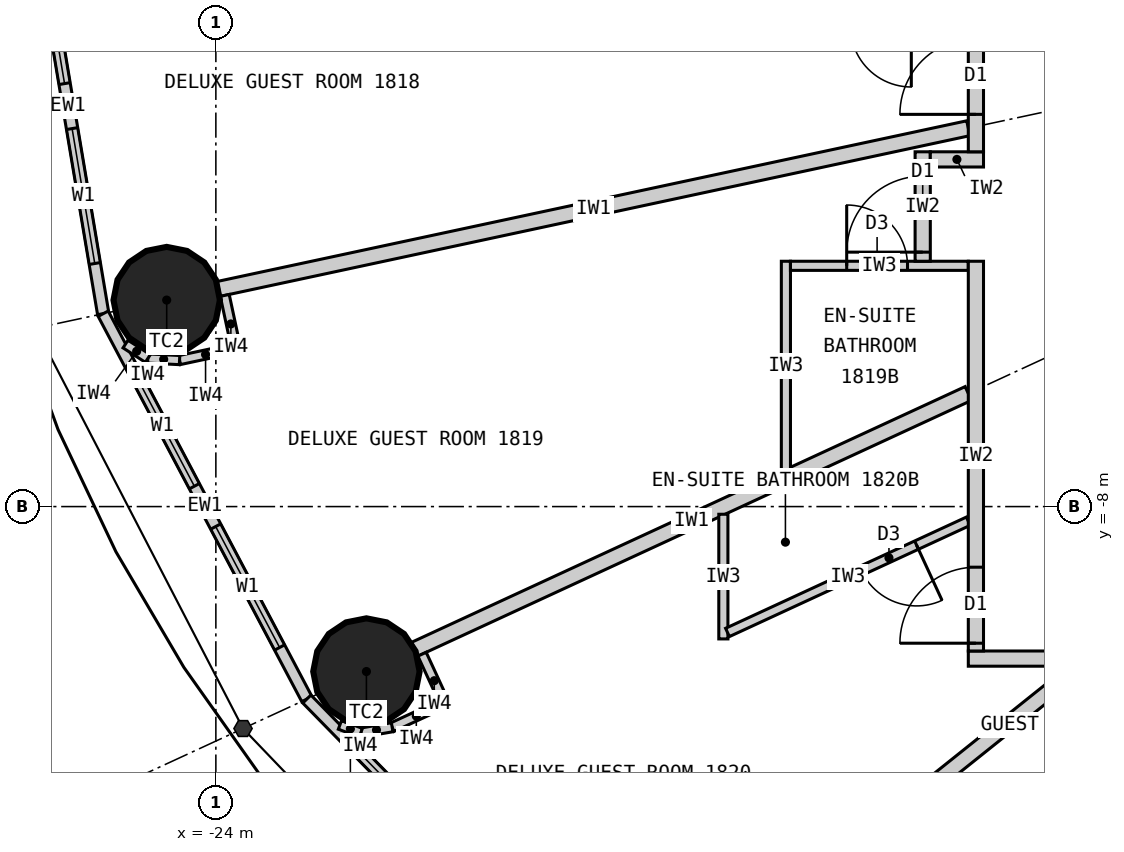
"""IFC4 building model, lengths in metres.
Left out: names, types, materials, properties, quantities, classifications, styles, units other than length and angle.
Written with IfcOpenShell. Run it as: python <this file> out.ifc"""

import sys

from ifc_helpers import new_model, si_unit, direction, frame, frame_2d, origin, origin_2d, place, context, subcontext, project, spatial, rectangle, circle, extrude, element, fill, save


model = new_model("IFC4")
c1 = context("Model", 3, precision=1e-05, world=origin(), true_north=direction((0.0, 1.0)))
c2 = subcontext(c1, "Body", "Model", "MODEL_VIEW")
j1 = project(units=[si_unit("LENGTHUNIT", "METRE"), si_unit("PLANEANGLEUNIT", "RADIAN")], contexts=[c1])
p1 = place(None, origin())
s1 = spatial("IfcSite", under=j1, at=p1, CompositionType="ELEMENT")
p2 = place(p1, origin())
s2 = spatial("IfcBuilding", under=s1, at=p2, CompositionType="ELEMENT")
p3 = place(p2, frame((0.0, 0.0, 73.8)))
s3 = spatial("IfcBuildingStorey", under=s2, at=p3, CompositionType="ELEMENT", Elevation=73.8)
for number, where, z_axis, x_axis in (
    (1, (-24.647, -5.283, 0.0), (0.0, 0.0, 1.0), (1.0, 0.0, 0.0)),
    (2, (-22.019, -10.17, 0.0), (0.0, 0.0, 1.0), (1.0, 0.0, 0.0)),
):
    element("IfcColumn", number, at=place(p3, frame(where, z_axis=z_axis, x_axis=x_axis)), inside=s3, PredefinedType="COLUMN", context=c2, shape_type="SweptSolid", body=[
        extrude(circle(Radius=0.7, at=origin_2d()), origin(), (0.0, 0.0, 1.0), 3.3),
    ])
p4 = place(p3, frame((-26.4, 0.0, 0.0), z_axis=(0.0, 0.0, 1.0), x_axis=(0.165642551694, -0.986185857264, 0.0)))
e3 = element("IfcWall", 3, at=p4, inside=s3, PredefinedType="ELEMENTEDWALL", context=c2, shape_type="SweptSolid", body=[
    extrude(rectangle(XDim=5.539, YDim=0.15, at=frame_2d((2.77, 0.0))), origin(), (0.0, 0.0, 1.0), 3.12),
])
p5 = place(p4, frame((0.669, 0.0, 0.9)))
e4 = element("IfcOpeningElement", 4, at=p5, cuts=e3, PredefinedType="OPENING", context=c2, shape_type="SweptSolid", body=[
    extrude(rectangle(XDim=1.8, YDim=1.9, at=frame_2d((0.9, 0.95))), frame((0.0, 0.085, 0.0), z_axis=(0.0, -1.0, 0.0), x_axis=(1.0, 0.0, 0.0)), (0.0, 0.0, 1.0), 0.17),
])
p6 = place(p4, frame((3.07, 0.0, 0.9)))
e5 = element("IfcOpeningElement", 5, at=p6, cuts=e3, PredefinedType="OPENING", context=c2, shape_type="SweptSolid", body=[
    extrude(rectangle(XDim=1.8, YDim=1.9, at=frame_2d((0.9, 0.95))), frame((0.0, 0.085, 0.0), z_axis=(0.0, -1.0, 0.0), x_axis=(1.0, 0.0, 0.0)), (0.0, 0.0, 1.0), 0.17),
])
p7 = place(p3, frame((-25.482, -5.462, 0.0), z_axis=(0.0, 0.0, 1.0), x_axis=(0.467296867008, -0.884100468321, 0.0)))
e6 = element("IfcWall", 6, at=p7, inside=s3, PredefinedType="ELEMENTEDWALL", context=c2, shape_type="SweptSolid", body=[
    extrude(rectangle(XDim=5.734, YDim=0.15, at=frame_2d((2.867, 0.0))), origin(), (0.0, 0.0, 1.0), 3.12),
])
p8 = place(p7, frame((0.767, 0.0, 0.9)))
e7 = element("IfcOpeningElement", 7, at=p8, cuts=e6, PredefinedType="OPENING", context=c2, shape_type="SweptSolid", body=[
    extrude(rectangle(XDim=1.8, YDim=1.9, at=frame_2d((0.9, 0.95))), frame((0.0, 0.085, 0.0), z_axis=(0.0, -1.0, 0.0), x_axis=(1.0, 0.0, 0.0)), (0.0, 0.0, 1.0), 0.17),
])
p9 = place(p7, frame((3.167, 0.0, 0.9)))
e8 = element("IfcOpeningElement", 8, at=p9, cuts=e6, PredefinedType="OPENING", context=c2, shape_type="SweptSolid", body=[
    extrude(rectangle(XDim=1.8, YDim=1.9, at=frame_2d((0.9, 0.95))), frame((0.0, 0.085, 0.0), z_axis=(0.0, -1.0, 0.0), x_axis=(1.0, 0.0, 0.0)), (0.0, 0.0, 1.0), 0.17),
])
p10 = place(p3, frame((-22.803, -10.532, 0.0), z_axis=(0.0, 0.0, 1.0), x_axis=(0.699602905915, -0.714531856557, 0.0)))
e9 = element("IfcWall", 9, at=p10, inside=s3, PredefinedType="ELEMENTEDWALL", context=c2, shape_type="SweptSolid", body=[
    extrude(rectangle(XDim=6.051, YDim=0.15, at=frame_2d((3.025, 0.0))), origin(), (0.0, 0.0, 1.0), 3.12),
])
p11 = place(p10, frame((0.926, 0.0, 0.9)))
e10 = element("IfcOpeningElement", 10, at=p11, cuts=e9, PredefinedType="OPENING", context=c2, shape_type="SweptSolid", body=[
    extrude(rectangle(XDim=1.8, YDim=1.9, at=frame_2d((0.9, 0.95))), frame((0.0, 0.085, 0.0), z_axis=(0.0, -1.0, 0.0), x_axis=(1.0, 0.0, 0.0)), (0.0, 0.0, 1.0), 0.17),
])
p12 = place(p10, frame((3.325, 0.0, 0.9)))
e11 = element("IfcOpeningElement", 11, at=p12, cuts=e9, PredefinedType="OPENING", context=c2, shape_type="SweptSolid", body=[
    extrude(rectangle(XDim=1.8, YDim=1.9, at=frame_2d((0.9, 0.95))), frame((0.0, 0.085, 0.0), z_axis=(0.0, -1.0, 0.0), x_axis=(1.0, 0.0, 0.0)), (0.0, 0.0, 1.0), 0.17),
])
p13 = place(p3, frame((14.1, -10.0, 0.0), z_axis=(0.0, 0.0, 1.0), x_axis=(-1.0, 0.0, 0.0)))
e12 = element("IfcWall", 12, at=p13, inside=s3, PredefinedType="PARTITIONING", context=c2, shape_type="SweptSolid", body=[
    extrude(rectangle(XDim=28.2, YDim=0.2, at=frame_2d((14.1, 0.0))), origin(), (0.0, 0.0, 1.0), 3.12),
])
p14 = place(p13, frame((24.165, 0.0, 0.0)))
e13 = element("IfcOpeningElement", 13, at=p14, cuts=e12, PredefinedType="OPENING", context=c2, shape_type="SweptSolid", body=[
    extrude(rectangle(XDim=1.0, YDim=2.2, at=frame_2d((0.5, 1.1))), frame((0.0, 0.11, 0.0), z_axis=(0.0, -1.0, 0.0), x_axis=(1.0, 0.0, 0.0)), (0.0, 0.0, 1.0), 0.22),
])
p15 = place(p13, frame((14.923, 0.0, 0.0)))
e14 = element("IfcOpeningElement", 14, at=p15, cuts=e12, PredefinedType="OPENING", context=c2, shape_type="SweptSolid", body=[
    extrude(rectangle(XDim=1.0, YDim=2.2, at=frame_2d((0.5, 1.1))), frame((0.0, 0.11, 0.0), z_axis=(0.0, -1.0, 0.0), x_axis=(1.0, 0.0, 0.0)), (0.0, 0.0, 1.0), 0.22),
])
p16 = place(p13, frame((3.035, 0.0, 0.0)))
e15 = element("IfcOpeningElement", 15, at=p16, cuts=e12, PredefinedType="OPENING", context=c2, shape_type="SweptSolid", body=[
    extrude(rectangle(XDim=1.0, YDim=2.2, at=frame_2d((0.5, 1.1))), frame((0.0, 0.11, 0.0), z_axis=(0.0, -1.0, 0.0), x_axis=(1.0, 0.0, 0.0)), (0.0, 0.0, 1.0), 0.22),
])
p17 = place(p3, frame((-14.1, -3.022, 0.0), z_axis=(0.0, 0.0, 1.0), x_axis=(-0.977790014929, -0.209586943072, 0.0)))
e16 = element("IfcWall", 16, at=p17, inside=s3, PredefinedType="PARTITIONING", context=c2, shape_type="SweptSolid", body=[
    extrude(rectangle(XDim=10.087, YDim=0.2, at=frame_2d((5.043, 0.0))), origin(), (0.0, 0.0, 1.0), 2.32),
])
p18 = place(p3, frame((-14.1, -6.512, 0.0), z_axis=(0.0, 0.0, 1.0), x_axis=(-0.907832871056, -0.419332181247, 0.0)))
e17 = element("IfcWall", 17, at=p18, inside=s3, PredefinedType="PARTITIONING", context=c2, shape_type="SweptSolid", body=[
    extrude(rectangle(XDim=8.023, YDim=0.2, at=frame_2d((4.011, 0.0))), origin(), (0.0, 0.0, 1.0), 2.32),
])
p19 = place(p3, frame((-12.625, -10.1, 0.0), z_axis=(0.0, 0.0, 1.0), x_axis=(-0.780892451574, -0.624665493744, 0.0)))
e18 = element("IfcWall", 18, at=p19, inside=s3, PredefinedType="PARTITIONING", context=c2, shape_type="SweptSolid", body=[
    extrude(rectangle(XDim=6.045, YDim=0.2, at=frame_2d((3.022, 0.0))), origin(), (0.0, 0.0, 1.0), 2.32),
])
p20 = place(p3, frame((-16.5, -7.521, 0.0), z_axis=(0.0, 0.0, 1.0), x_axis=(0.0, 1.0, 0.0)))
e19 = element("IfcWall", 19, at=p20, inside=s3, PredefinedType="PARTITIONING", context=c2, shape_type="SweptSolid", body=[
    extrude(rectangle(XDim=2.749, YDim=0.12, at=frame_2d((1.374, 0.0))), origin(), (0.0, 0.0, 1.0), 3.12),
])
p21 = place(p3, frame((-14.1, -4.833, 0.0), z_axis=(0.0, 0.0, 1.0), x_axis=(-1.0, 0.0, 0.0)))
e20 = element("IfcWall", 20, at=p21, inside=s3, PredefinedType="PARTITIONING", context=c2, shape_type="SweptSolid", body=[
    extrude(rectangle(XDim=2.34, YDim=0.12, at=frame_2d((1.17, 0.0))), origin(), (0.0, 0.0, 1.0), 3.12),
])
p22 = place(p21, frame((0.8, 0.0, 0.0)))
e21 = element("IfcOpeningElement", 21, at=p22, cuts=e20, PredefinedType="OPENING", context=c2, shape_type="SweptSolid", body=[
    extrude(rectangle(XDim=0.8, YDim=2.1, at=frame_2d((0.4, 1.05))), frame((0.0, 0.07, 0.0), z_axis=(0.0, -1.0, 0.0), x_axis=(1.0, 0.0, 0.0)), (0.0, 0.0, 1.0), 0.14),
])
p23 = place(p3, frame((-17.323, -8.101, 0.0), z_axis=(0.0, 0.0, 1.0), x_axis=(0.0, -1.0, 0.0)))
e22 = element("IfcWall", 22, at=p23, inside=s3, PredefinedType="PARTITIONING", context=c2, shape_type="SweptSolid", body=[
    extrude(rectangle(XDim=1.64, YDim=0.12, at=frame_2d((0.82, 0.0))), origin(), (0.0, 0.0, 1.0), 3.12),
])
p24 = place(p3, frame((-14.1, -8.193, 0.0), z_axis=(0.0, 0.0, 1.0), x_axis=(-0.907836493557, -0.419324338628, 0.0)))
e23 = element("IfcWall", 23, at=p24, inside=s3, PredefinedType="PARTITIONING", context=c2, shape_type="SweptSolid", body=[
    extrude(rectangle(XDim=3.49, YDim=0.12, at=frame_2d((1.745, 0.0))), origin(), (0.0, 0.0, 1.0), 3.12),
])
p25 = place(p24, frame((0.75, 0.0, 0.0)))
e24 = element("IfcOpeningElement", 24, at=p25, cuts=e23, PredefinedType="OPENING", context=c2, shape_type="SweptSolid", body=[
    extrude(rectangle(XDim=0.8, YDim=2.1, at=frame_2d((0.4, 1.05))), frame((0.0, 0.07, 0.0), z_axis=(0.0, -1.0, 0.0), x_axis=(1.0, 0.0, 0.0)), (0.0, 0.0, 1.0), 0.14),
])
p26 = place(p3, frame((-14.7, -3.333, 0.0), z_axis=(0.0, 0.0, 1.0), x_axis=(0.0, -1.0, 0.0)))
e25 = element("IfcWall", 25, at=p26, inside=s3, PredefinedType="PARTITIONING", context=c2, shape_type="SweptSolid", body=[
    extrude(rectangle(XDim=1.44, YDim=0.2, at=frame_2d((0.72, 0.0))), origin(), (0.0, 0.0, 1.0), 3.12),
])
p27 = place(p26, frame((0.32, 0.0, 0.0)))
e26 = element("IfcOpeningElement", 26, at=p27, cuts=e25, PredefinedType="OPENING", context=c2, shape_type="SweptSolid", body=[
    extrude(rectangle(XDim=1.0, YDim=2.2, at=frame_2d((0.5, 1.1))), frame((0.0, 0.11, 0.0), z_axis=(0.0, -1.0, 0.0), x_axis=(1.0, 0.0, 0.0)), (0.0, 0.0, 1.0), 0.22),
])
p28 = place(p3, frame((-13.9, -3.433, 0.0), z_axis=(0.0, 0.0, 1.0), x_axis=(-1.0, 0.0, 0.0)))
e27 = element("IfcWall", 27, at=p28, inside=s3, PredefinedType="PARTITIONING", context=c2, shape_type="SweptSolid", body=[
    extrude(rectangle(XDim=0.7, YDim=0.2, at=frame_2d((0.35, 0.0))), origin(), (0.0, 0.0, 1.0), 2.32),
])
p29 = place(p3, frame((-14.0, 3.333, 0.0), z_axis=(0.0, 0.0, 1.0), x_axis=(0.0, -1.0, 0.0)))
e28 = element("IfcWall", 28, at=p29, inside=s3, PredefinedType="PARTITIONING", context=c2, shape_type="SweptSolid", body=[
    extrude(rectangle(XDim=6.665, YDim=0.2, at=frame_2d((3.333, 0.0))), origin(), (0.0, 0.0, 1.0), 3.12),
])
p30 = place(p29, frame((2.15, 0.0, 0.0)))
e29 = element("IfcOpeningElement", 29, at=p30, cuts=e28, PredefinedType="OPENING", context=c2, shape_type="SweptSolid", body=[
    extrude(rectangle(XDim=1.0, YDim=2.2, at=frame_2d((0.5, 1.1))), frame((0.0, 0.11, 0.0), z_axis=(0.0, -1.0, 0.0), x_axis=(1.0, 0.0, 0.0)), (0.0, 0.0, 1.0), 0.22),
])
p31 = place(p29, frame((5.173, 0.0, 0.0)))
e30 = element("IfcOpeningElement", 30, at=p31, cuts=e28, PredefinedType="OPENING", context=c2, shape_type="SweptSolid", body=[
    extrude(rectangle(XDim=1.0, YDim=2.2, at=frame_2d((0.5, 1.1))), frame((0.0, 0.11, 0.0), z_axis=(0.0, -1.0, 0.0), x_axis=(1.0, 0.0, 0.0)), (0.0, 0.0, 1.0), 0.22),
])
p32 = place(p3, frame((-14.0, -4.772, 0.0), z_axis=(0.0, 0.0, 1.0), x_axis=(0.0, -1.0, 0.0)))
e31 = element("IfcWall", 31, at=p32, inside=s3, PredefinedType="PARTITIONING", context=c2, shape_type="SweptSolid", body=[
    extrude(rectangle(XDim=5.127, YDim=0.2, at=frame_2d((2.564, 0.0))), origin(), (0.0, 0.0, 1.0), 3.12),
])
p33 = place(p32, frame((4.025, 0.0, 0.0)))
e32 = element("IfcOpeningElement", 32, at=p33, cuts=e31, PredefinedType="OPENING", context=c2, shape_type="SweptSolid", body=[
    extrude(rectangle(XDim=1.0, YDim=2.2, at=frame_2d((0.5, 1.1))), frame((0.0, 0.11, 0.0), z_axis=(0.0, -1.0, 0.0), x_axis=(1.0, 0.0, 0.0)), (0.0, 0.0, 1.0), 0.22),
])
p34 = place(p3, frame((-23.883, -5.222, 0.0), z_axis=(0.0, 0.0, 1.0), x_axis=(0.209311842415, -0.977848941619, 0.0)))
e33 = element("IfcWall", 33, at=p34, inside=s3, PredefinedType="PARTITIONING", context=c2, shape_type="SweptSolid", body=[
    extrude(rectangle(XDim=0.768, YDim=0.12, at=frame_2d((0.384, 0.0))), origin(), (0.0, 0.0, 1.0), 3.12),
])
p35 = place(p3, frame((-23.793, -5.926, 0.0), z_axis=(0.0, 0.0, 1.0), x_axis=(-0.977792206673, -0.209576717621, 0.0)))
e34 = element("IfcWall", 34, at=p35, inside=s3, PredefinedType="PARTITIONING", context=c2, shape_type="SweptSolid", body=[
    extrude(rectangle(XDim=0.7, YDim=0.12, at=frame_2d((0.35, 0.0))), origin(), (0.0, 0.0, 1.0), 3.12),
])
p36 = place(p3, frame((-24.478, -6.073, 0.0), z_axis=(0.0, 0.0, 1.0), x_axis=(-0.998708262812, 0.05081147302, 0.0)))
e35 = element("IfcWall", 35, at=p36, inside=s3, PredefinedType="PARTITIONING", context=c2, shape_type="SweptSolid", body=[
    extrude(rectangle(XDim=0.418, YDim=0.12, at=frame_2d((0.209, 0.0))), origin(), (0.0, 0.0, 1.0), 3.12),
])
p37 = place(p3, frame((-24.895, -6.052, 0.0), z_axis=(0.0, 0.0, 1.0), x_axis=(-0.839495197275, 0.54336710772, 0.0)))
e36 = element("IfcWall", 36, at=p37, inside=s3, PredefinedType="PARTITIONING", context=c2, shape_type="SweptSolid", body=[
    extrude(rectangle(XDim=0.35, YDim=0.12, at=frame_2d((0.175, 0.0))), origin(), (0.0, 0.0, 1.0), 3.12),
])
p38 = place(p3, frame((-21.287, -9.942, 0.0), z_axis=(0.0, 0.0, 1.0), x_axis=(0.419259891039, -0.907866258744, 0.0)))
e37 = element("IfcWall", 37, at=p38, inside=s3, PredefinedType="PARTITIONING", context=c2, shape_type="SweptSolid", body=[
    extrude(rectangle(XDim=0.768, YDim=0.12, at=frame_2d((0.384, 0.0))), origin(), (0.0, 0.0, 1.0), 3.12),
])
p39 = place(p3, frame((-21.045, -10.61, 0.0), z_axis=(0.0, 0.0, 1.0), x_axis=(-0.907877701396, -0.419235112208, 0.0)))
e38 = element("IfcWall", 38, at=p39, inside=s3, PredefinedType="PARTITIONING", context=c2, shape_type="SweptSolid", body=[
    extrude(rectangle(XDim=0.7, YDim=0.12, at=frame_2d((0.35, 0.0))), origin(), (0.0, 0.0, 1.0), 3.12),
])
p40 = place(p3, frame((-21.68, -10.903, 0.0), z_axis=(0.0, 0.0, 1.0), x_axis=(-0.985446622073, -0.169985161247, 0.0)))
e39 = element("IfcWall", 39, at=p40, inside=s3, PredefinedType="PARTITIONING", context=c2, shape_type="SweptSolid", body=[
    extrude(rectangle(XDim=0.418, YDim=0.12, at=frame_2d((0.209, 0.0))), origin(), (0.0, 0.0, 1.0), 3.12),
])
p41 = place(p3, frame((-22.092, -10.974, 0.0), z_axis=(0.0, 0.0, 1.0), x_axis=(-0.938428160676, 0.345474437912, 0.0)))
e40 = element("IfcWall", 40, at=p41, inside=s3, PredefinedType="PARTITIONING", context=c2, shape_type="SweptSolid", body=[
    extrude(rectangle(XDim=0.294, YDim=0.12, at=frame_2d((0.147, 0.0))), origin(), (0.0, 0.0, 1.0), 3.12),
])
p42 = place(p5, origin())
e41 = element("IfcWindow", 41, at=p42, inside=s3, PartitioningType="SINGLE_PANEL", PredefinedType="WINDOW", context=c2, shape_type="SweptSolid", body=[
    extrude(rectangle(XDim=1.8, YDim=1.9, at=frame_2d((0.9, 0.95))), frame((0.0, 0.03, 0.0), z_axis=(0.0, -1.0, 0.0), x_axis=(1.0, 0.0, 0.0)), (0.0, 0.0, 1.0), 0.06),
])
fill(e4, e41)
p43 = place(p6, origin())
e42 = element("IfcWindow", 42, at=p43, inside=s3, PartitioningType="SINGLE_PANEL", PredefinedType="WINDOW", context=c2, shape_type="SweptSolid", body=[
    extrude(rectangle(XDim=1.8, YDim=1.9, at=frame_2d((0.9, 0.95))), frame((0.0, 0.03, 0.0), z_axis=(0.0, -1.0, 0.0), x_axis=(1.0, 0.0, 0.0)), (0.0, 0.0, 1.0), 0.06),
])
fill(e5, e42)
p44 = place(p8, origin())
e43 = element("IfcWindow", 43, at=p44, inside=s3, PartitioningType="SINGLE_PANEL", PredefinedType="WINDOW", context=c2, shape_type="SweptSolid", body=[
    extrude(rectangle(XDim=1.8, YDim=1.9, at=frame_2d((0.9, 0.95))), frame((0.0, 0.03, 0.0), z_axis=(0.0, -1.0, 0.0), x_axis=(1.0, 0.0, 0.0)), (0.0, 0.0, 1.0), 0.06),
])
fill(e7, e43)
p45 = place(p9, origin())
e44 = element("IfcWindow", 44, at=p45, inside=s3, PartitioningType="SINGLE_PANEL", PredefinedType="WINDOW", context=c2, shape_type="SweptSolid", body=[
    extrude(rectangle(XDim=1.8, YDim=1.9, at=frame_2d((0.9, 0.95))), frame((0.0, 0.03, 0.0), z_axis=(0.0, -1.0, 0.0), x_axis=(1.0, 0.0, 0.0)), (0.0, 0.0, 1.0), 0.06),
])
fill(e8, e44)
p46 = place(p11, origin())
e45 = element("IfcWindow", 45, at=p46, inside=s3, PartitioningType="SINGLE_PANEL", PredefinedType="WINDOW", context=c2, shape_type="SweptSolid", body=[
    extrude(rectangle(XDim=1.8, YDim=1.9, at=frame_2d((0.9, 0.95))), frame((0.0, 0.03, 0.0), z_axis=(0.0, -1.0, 0.0), x_axis=(1.0, 0.0, 0.0)), (0.0, 0.0, 1.0), 0.06),
])
fill(e10, e45)
p47 = place(p31, origin())
e46 = element("IfcDoor", 46, at=p47, inside=s3, OperationType="SINGLE_SWING_RIGHT", PredefinedType="DOOR", context=c2, shape_type="SweptSolid", body=[
    extrude(rectangle(XDim=1.0, YDim=2.2, at=frame_2d((0.5, 1.1))), frame((0.0, 0.025, 0.0), z_axis=(0.0, -1.0, 0.0), x_axis=(1.0, 0.0, 0.0)), (0.0, 0.0, 1.0), 0.05),
])
fill(e30, e46)
p48 = place(p22, origin())
e47 = element("IfcDoor", 47, at=p48, inside=s3, OperationType="SINGLE_SWING_RIGHT", PredefinedType="DOOR", context=c2, shape_type="SweptSolid", body=[
    extrude(rectangle(XDim=0.8, YDim=2.1, at=frame_2d((0.4, 1.05))), frame((0.0, 0.025, 0.0), z_axis=(0.0, -1.0, 0.0), x_axis=(1.0, 0.0, 0.0)), (0.0, 0.0, 1.0), 0.05),
])
fill(e21, e47)
p49 = place(p27, origin())
e48 = element("IfcDoor", 48, at=p49, inside=s3, OperationType="SINGLE_SWING_RIGHT", PredefinedType="DOOR", context=c2, shape_type="SweptSolid", body=[
    extrude(rectangle(XDim=1.0, YDim=2.2, at=frame_2d((0.5, 1.1))), frame((0.0, 0.025, 0.0), z_axis=(0.0, -1.0, 0.0), x_axis=(1.0, 0.0, 0.0)), (0.0, 0.0, 1.0), 0.05),
])
fill(e26, e48)
p50 = place(p25, origin())
e49 = element("IfcDoor", 49, at=p50, inside=s3, OperationType="SINGLE_SWING_LEFT", PredefinedType="DOOR", context=c2, shape_type="SweptSolid", body=[
    extrude(rectangle(XDim=0.8, YDim=2.1, at=frame_2d((0.4, 1.05))), frame((0.0, 0.025, 0.0), z_axis=(0.0, -1.0, 0.0), x_axis=(1.0, 0.0, 0.0)), (0.0, 0.0, 1.0), 0.05),
])
fill(e24, e49)
p51 = place(p33, origin())
e50 = element("IfcDoor", 50, at=p51, inside=s3, OperationType="SINGLE_SWING_RIGHT", PredefinedType="DOOR", context=c2, shape_type="SweptSolid", body=[
    extrude(rectangle(XDim=1.0, YDim=2.2, at=frame_2d((0.5, 1.1))), frame((0.0, 0.025, 0.0), z_axis=(0.0, -1.0, 0.0), x_axis=(1.0, 0.0, 0.0)), (0.0, 0.0, 1.0), 0.05),
])
fill(e32, e50)
save(model, sys.argv[1])
